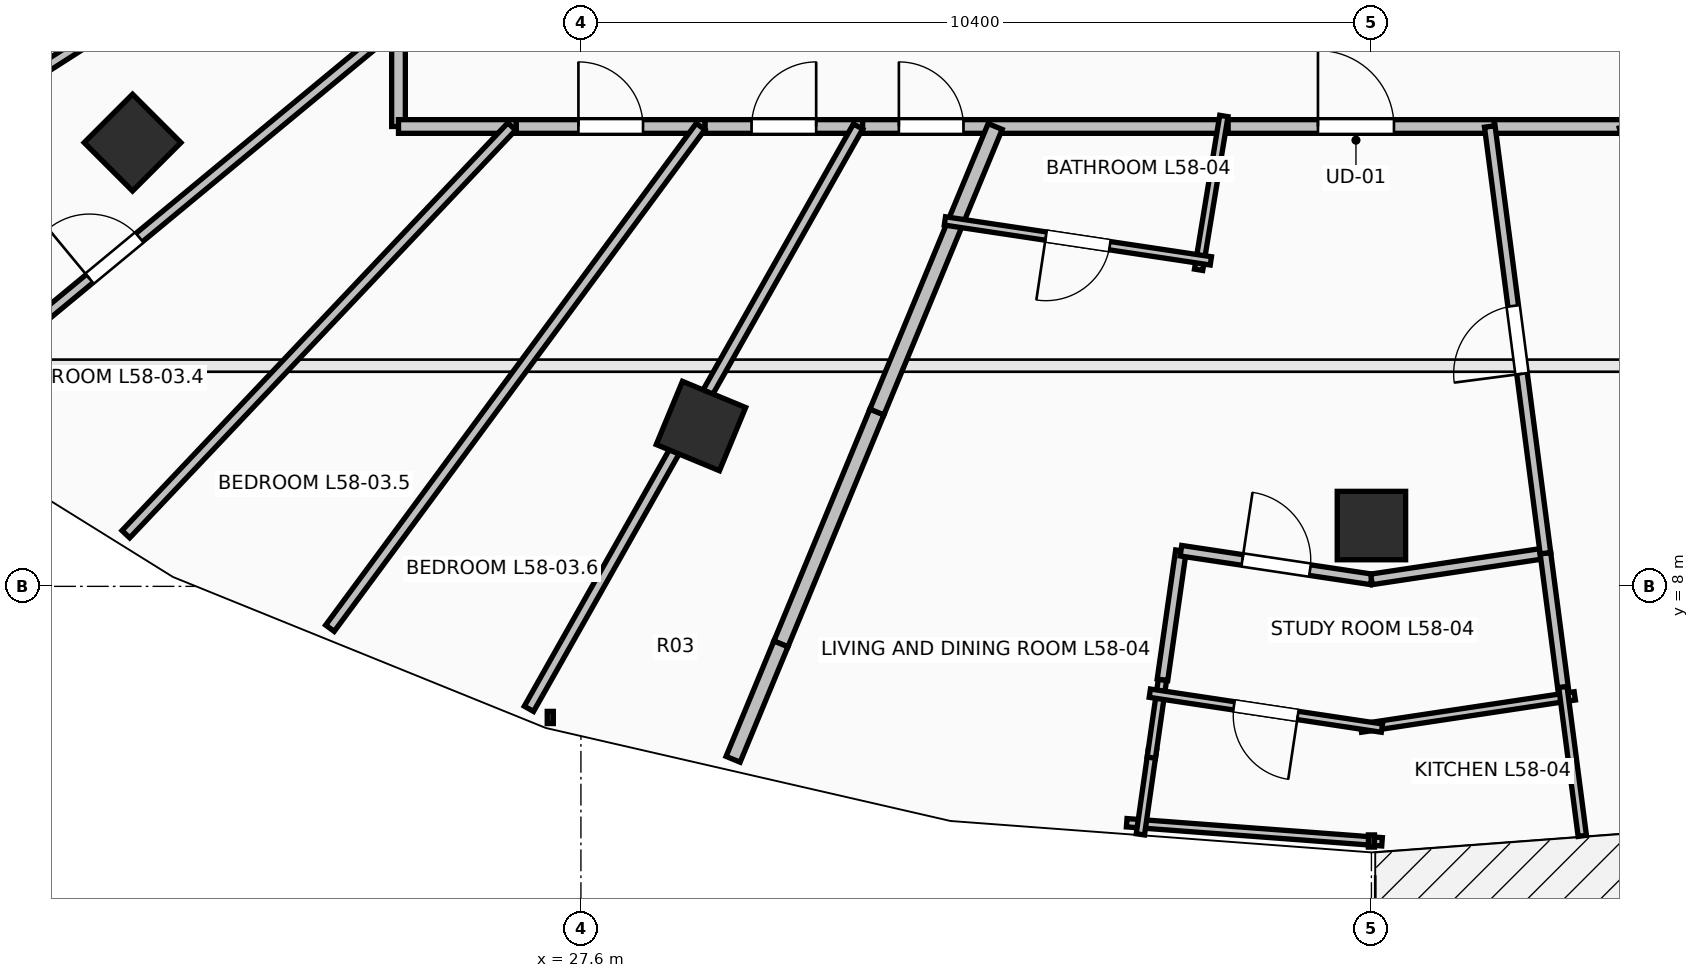
"""IFC4 building model, lengths in metres.
Left out: names, types, materials, properties, quantities, classifications, styles, units other than length and angle.
Written with IfcOpenShell. Run it as: python <this file> out.ifc"""

import sys

from ifc_helpers import new_model, si_unit, direction, frame, frame_2d, origin, origin_2d, place, context, subcontext, project, spatial, rectangle, extrude, element, fill, save


model = new_model("IFC4")
c1 = context("Model", 3, precision=1e-05, world=origin(), true_north=direction((0.0, 1.0)))
c2 = subcontext(c1, "Body", "Model", "MODEL_VIEW")
j1 = project(units=[si_unit("LENGTHUNIT", "METRE"), si_unit("PLANEANGLEUNIT", "RADIAN")], contexts=[c1])
p1 = place(None, origin())
s1 = spatial("IfcSite", under=j1, at=p1, CompositionType="ELEMENT")
p2 = place(p1, origin())
s2 = spatial("IfcBuilding", under=s1, at=p2, CompositionType="ELEMENT")
p3 = place(p2, frame((0.0, 0.0, 214.3)))
s3 = spatial("IfcBuildingStorey", under=s2, at=p3, CompositionType="ELEMENT", Elevation=214.3)
for number, where, z_axis, x_axis in (
    (1, (21.701, 13.838, 0.0), (0.0, 0.0, 1.0), (-0.707, -0.707, 0.0)),
    (2, (29.179, 10.109, 0.0), (0.0, 0.0, 1.0), (-0.383, -0.924, 0.0)),
    (3, (38.0, 8.8, 0.0), (0.0, 0.0, 1.0), (0.0, -1.0, 0.0)),
):
    element("IfcColumn", number, at=place(p3, frame(where, z_axis=z_axis, x_axis=x_axis)), inside=s3, PredefinedType="COLUMN", context=c2, shape_type="SweptSolid", body=[
        extrude(rectangle(XDim=0.9, YDim=0.9, at=origin_2d()), origin(), (0.0, 0.0, 1.0), 3.55),
    ])
p4 = place(p3, frame((25.2, 15.333, 0.0), z_axis=(0.0, 0.0, 1.0), x_axis=(0.0, -1.0, 0.0)))
e4 = element("IfcWall", 4, at=p4, inside=s3, PredefinedType="PARTITIONING", context=c2, shape_type="SweptSolid", body=[
    extrude(rectangle(XDim=1.283, YDim=0.18, at=frame_2d((0.642, 0.0))), origin(), (0.0, 0.0, 1.0), 2.482),
])
p5 = place(p3, frame((25.2, 14.05, 0.0), z_axis=(0.0, 0.0, 1.0), x_axis=(1.0, 0.0, 0.0)))
e5 = element("IfcWall", 5, at=p5, inside=s3, PredefinedType="PARTITIONING", context=c2, shape_type="SweptSolid", body=[
    extrude(rectangle(XDim=1.55, YDim=0.18, at=frame_2d((0.775, 0.0))), origin(), (0.0, 0.0, 1.0), 2.936),
])
p6 = place(p3, frame((26.75, 14.05, 0.0), z_axis=(0.0, 0.0, 1.0), x_axis=(1.0, 0.0, 0.0)))
e6 = element("IfcWall", 6, at=p6, inside=s3, PredefinedType="PARTITIONING", context=c2, shape_type="SweptSolid", body=[
    extrude(rectangle(XDim=2.484, YDim=0.18, at=frame_2d((1.242, 0.0))), origin(), (0.0, 0.0, 1.0), 2.482),
])
p7 = place(p6, frame((0.817, 0.0, 0.0)))
e7 = element("IfcOpeningElement", 7, at=p7, cuts=e6, PredefinedType="OPENING", context=c2, shape_type="SweptSolid", body=[
    extrude(rectangle(XDim=0.85, YDim=2.1, at=frame_2d((0.425, 1.05))), frame((0.0, 0.105, 0.0), z_axis=(0.0, -1.0, 0.0), x_axis=(1.0, 0.0, 0.0)), (0.0, 0.0, 1.0), 0.21),
])
p8 = place(p3, frame((29.234, 14.05, 0.0), z_axis=(0.0, 0.0, 1.0), x_axis=(1.0, 0.0, 0.0)))
e8 = element("IfcWall", 8, at=p8, inside=s3, PredefinedType="PARTITIONING", context=c2, shape_type="SweptSolid", body=[
    extrude(rectangle(XDim=2.072, YDim=0.18, at=frame_2d((1.036, 0.0))), origin(), (0.0, 0.0, 1.0), 3.29),
])
p9 = place(p8, frame((0.611, 0.0, 0.0)))
e9 = element("IfcOpeningElement", 9, at=p9, cuts=e8, PredefinedType="OPENING", context=c2, shape_type="SweptSolid", body=[
    extrude(rectangle(XDim=0.85, YDim=2.1, at=frame_2d((0.425, 1.05))), frame((0.0, 0.105, 0.0), z_axis=(0.0, -1.0, 0.0), x_axis=(1.0, 0.0, 0.0)), (0.0, 0.0, 1.0), 0.21),
])
p10 = place(p3, frame((31.306, 14.05, 0.0), z_axis=(0.0, 0.0, 1.0), x_axis=(1.0, 0.0, 0.0)))
e10 = element("IfcWall", 10, at=p10, inside=s3, PredefinedType="PARTITIONING", context=c2, shape_type="SweptSolid", body=[
    extrude(rectangle(XDim=1.804, YDim=0.18, at=frame_2d((0.902, 0.0))), origin(), (0.0, 0.0, 1.0), 3.29),
])
p11 = place(p10, frame((0.477, 0.0, 0.0)))
e11 = element("IfcOpeningElement", 11, at=p11, cuts=e10, PredefinedType="OPENING", context=c2, shape_type="SweptSolid", body=[
    extrude(rectangle(XDim=0.85, YDim=2.1, at=frame_2d((0.425, 1.05))), frame((0.0, 0.105, 0.0), z_axis=(0.0, -1.0, 0.0), x_axis=(1.0, 0.0, 0.0)), (0.0, 0.0, 1.0), 0.21),
])
p12 = place(p3, frame((35.975, 14.05, 0.0), z_axis=(0.0, 0.0, 1.0), x_axis=(1.0, 0.0, 0.0)))
e12 = element("IfcWall", 12, at=p12, inside=s3, PredefinedType="PARTITIONING", context=c2, shape_type="SweptSolid", body=[
    extrude(rectangle(XDim=3.643, YDim=0.18, at=frame_2d((1.821, 0.0))), origin(), (0.0, 0.0, 1.0), 2.979),
])
p13 = place(p12, frame((1.322, 0.0, 0.0)))
e13 = element("IfcOpeningElement", 13, at=p13, cuts=e12, PredefinedType="OPENING", context=c2, shape_type="SweptSolid", body=[
    extrude(rectangle(XDim=1.0, YDim=2.15, at=frame_2d((0.5, 1.075))), frame((0.0, 0.105, 0.0), z_axis=(0.0, -1.0, 0.0), x_axis=(1.0, 0.0, 0.0)), (0.0, 0.0, 1.0), 0.21),
])
p14 = place(p3, frame((32.97, 14.05, 0.0), z_axis=(0.0, 0.0, 1.0), x_axis=(1.0, 0.0, 0.0)))
e14 = element("IfcWall", 14, at=p14, inside=s3, PredefinedType="PARTITIONING", context=c2, shape_type="SweptSolid", body=[
    extrude(rectangle(XDim=3.145, YDim=0.18, at=frame_2d((1.573, 0.0))), origin(), (0.0, 0.0, 1.0), 2.979),
])
p15 = place(p3, frame((39.618, 14.05, 0.0), z_axis=(0.0, 0.0, 1.0), x_axis=(1.0, 0.0, 0.0)))
e15 = element("IfcWall", 15, at=p15, inside=s3, PredefinedType="PARTITIONING", context=c2, shape_type="SweptSolid", body=[
    extrude(rectangle(XDim=1.772, YDim=0.18, at=frame_2d((0.886, 0.0))), origin(), (0.0, 0.0, 1.0), 2.979),
])
p16 = place(p3, frame((14.217, 14.579, 0.0), z_axis=(0.0, 0.0, 1.0), x_axis=(0.901423599975, 0.432938209689, 0.0)))
e16 = element("IfcWall", 16, at=p16, inside=s3, PredefinedType="PARTITIONING", context=c2, shape_type="SweptSolid", body=[
    extrude(rectangle(XDim=12.184, YDim=0.14, at=frame_2d((6.092, 0.0))), origin(), (0.0, 0.0, 1.0), 2.482),
])
p17 = place(p3, frame((16.555, 12.272, 0.0), z_axis=(0.0, 0.0, 1.0), x_axis=(0.842221721565, 0.539131312135, 0.0)))
e17 = element("IfcWall", 17, at=p17, inside=s3, PredefinedType="PARTITIONING", context=c2, shape_type="SweptSolid", body=[
    extrude(rectangle(XDim=10.265, YDim=0.14, at=frame_2d((5.132, 0.0))), origin(), (0.0, 0.0, 1.0), 2.482),
])
p18 = place(p3, frame((19.02, 10.298, 0.0), z_axis=(0.0, 0.0, 1.0), x_axis=(0.770494327523, 0.637446853671, 0.0)))
e18 = element("IfcWall", 18, at=p18, inside=s3, PredefinedType="PARTITIONING", context=c2, shape_type="SweptSolid", body=[
    extrude(rectangle(XDim=8.021, YDim=0.14, at=frame_2d((4.01, 0.0))), origin(), (0.0, 0.0, 1.0), 2.482),
])
p19 = place(p18, frame((2.746, 0.0, 0.0)))
e19 = element("IfcOpeningElement", 19, at=p19, cuts=e18, PredefinedType="OPENING", context=c2, shape_type="SweptSolid", body=[
    extrude(rectangle(XDim=0.85, YDim=2.1, at=frame_2d((0.425, 1.05))), frame((0.0, 0.085, 0.0), z_axis=(0.0, -1.0, 0.0), x_axis=(1.0, 0.0, 0.0)), (0.0, 0.0, 1.0), 0.17),
])
p20 = place(p3, frame((21.613, 8.686, 0.0), z_axis=(0.0, 0.0, 1.0), x_axis=(0.68740257318, 0.726276601844, 0.0)))
e20 = element("IfcWall", 20, at=p20, inside=s3, PredefinedType="PARTITIONING", context=c2, shape_type="SweptSolid", body=[
    extrude(rectangle(XDim=7.386, YDim=0.14, at=frame_2d((3.693, 0.0))), origin(), (0.0, 0.0, 1.0), 2.824),
])
p21 = place(p3, frame((24.298, 7.449, 0.0), z_axis=(0.0, 0.0, 1.0), x_axis=(0.594148459094, 0.804355399408, 0.0)))
e21 = element("IfcWall", 21, at=p21, inside=s3, PredefinedType="PARTITIONING", context=c2, shape_type="SweptSolid", body=[
    extrude(rectangle(XDim=8.207, YDim=0.14, at=frame_2d((4.103, 0.0))), origin(), (0.0, 0.0, 1.0), 2.482),
])
p22 = place(p3, frame((26.916, 6.389, 0.0), z_axis=(0.0, 0.0, 1.0), x_axis=(0.492046286697, 0.870569039047, 0.0)))
e22 = element("IfcWall", 22, at=p22, inside=s3, PredefinedType="PARTITIONING", context=c2, shape_type="SweptSolid", body=[
    extrude(rectangle(XDim=8.8, YDim=0.14, at=frame_2d((4.4, 0.0))), origin(), (0.0, 0.0, 1.0), 2.482),
])
p23 = place(p3, frame((30.231, 7.243, 0.0), z_axis=(0.0, 0.0, 1.0), x_axis=(0.382467158794, 0.923969086303, 0.0)))
e23 = element("IfcWall", 23, at=p23, inside=s3, PredefinedType="PARTITIONING", context=c2, shape_type="SweptSolid", body=[
    extrude(rectangle(XDim=3.302, YDim=0.2, at=frame_2d((1.651, 0.0))), origin(), (0.0, 0.0, 1.0), 2.824),
])
p24 = place(p3, frame((31.494, 10.294, 0.0), z_axis=(0.0, 0.0, 1.0), x_axis=(0.382751310383, 0.923851413594, 0.0)))
e24 = element("IfcWall", 24, at=p24, inside=s3, PredefinedType="PARTITIONING", context=c2, shape_type="SweptSolid", body=[
    extrude(rectangle(XDim=4.066, YDim=0.2, at=frame_2d((2.033, 0.0))), origin(), (0.0, 0.0, 1.0), 2.936),
])
p25 = place(p3, frame((29.602, 5.725, 0.0), z_axis=(0.0, 0.0, 1.0), x_axis=(0.382789247432, 0.923835695376, 0.0)))
e25 = element("IfcWall", 25, at=p25, inside=s3, PredefinedType="PARTITIONING", context=c2, shape_type="SweptSolid", body=[
    extrude(rectangle(XDim=1.643, YDim=0.2, at=frame_2d((0.822, 0.0))), origin(), (0.0, 0.0, 1.0), 3.29),
])
p26 = place(p3, frame((36.059, 14.188, 0.0), z_axis=(0.0, 0.0, 1.0), x_axis=(-0.16206206721, -0.986780566474, 0.0)))
e26 = element("IfcWall", 26, at=p26, inside=s3, PredefinedType="PARTITIONING", context=c2, shape_type="SweptSolid", body=[
    extrude(rectangle(XDim=2.05, YDim=0.11, at=frame_2d((1.025, 0.0))), origin(), (0.0, 0.0, 1.0), 2.936),
])
p27 = place(p3, frame((35.887, 12.282, 0.0), z_axis=(0.0, 0.0, 1.0), x_axis=(-0.988902415317, 0.148566527121, 0.0)))
e27 = element("IfcWall", 27, at=p27, inside=s3, PredefinedType="PARTITIONING", context=c2, shape_type="SweptSolid", body=[
    extrude(rectangle(XDim=3.538, YDim=0.11, at=frame_2d((1.769, 0.0))), origin(), (0.0, 0.0, 1.0), 2.936),
])
p28 = place(p27, frame((1.344, 0.0, 0.0)))
e28 = element("IfcOpeningElement", 28, at=p28, cuts=e27, PredefinedType="OPENING", context=c2, shape_type="SweptSolid", body=[
    extrude(rectangle(XDim=0.85, YDim=2.1, at=frame_2d((0.425, 1.05))), frame((0.0, 0.07, 0.0), z_axis=(0.0, -1.0, 0.0), x_axis=(1.0, 0.0, 0.0)), (0.0, 0.0, 1.0), 0.14),
])
p29 = place(p3, frame((34.781, 4.89, 0.0), z_axis=(0.0, 0.0, 1.0), x_axis=(0.997225868556, -0.07443498561, 0.0)))
e29 = element("IfcWall", 29, at=p29, inside=s3, PredefinedType="PARTITIONING", context=c2, shape_type="SweptSolid", body=[
    extrude(rectangle(XDim=3.368, YDim=0.11, at=frame_2d((1.684, 0.0))), origin(), (0.0, 0.0, 1.0), 3.29),
])
p30 = place(p3, frame((34.96, 4.737, 0.0), z_axis=(0.0, 0.0, 1.0), x_axis=(0.141118797845, 0.989992669112, 0.0)))
e30 = element("IfcWall", 30, at=p30, inside=s3, PredefinedType="PARTITIONING", context=c2, shape_type="SweptSolid", body=[
    extrude(rectangle(XDim=1.13, YDim=0.11, at=frame_2d((0.565, 0.0))), origin(), (0.0, 0.0, 1.0), 3.29),
])
p31 = place(p3, frame((35.104, 5.747, 0.0), z_axis=(0.0, 0.0, 1.0), x_axis=(0.141751551652, 0.989902266693, 0.0)))
e31 = element("IfcWall", 31, at=p31, inside=s3, PredefinedType="PARTITIONING", context=c2, shape_type="SweptSolid", body=[
    extrude(rectangle(XDim=1.035, YDim=0.11, at=frame_2d((0.518, 0.0))), origin(), (0.0, 0.0, 1.0), 3.29),
])
p32 = place(p3, frame((35.251, 6.771, 0.0), z_axis=(0.0, 0.0, 1.0), x_axis=(0.141660537741, 0.98991529539, 0.0)))
e32 = element("IfcWall", 32, at=p32, inside=s3, PredefinedType="PARTITIONING", context=c2, shape_type="SweptSolid", body=[
    extrude(rectangle(XDim=1.715, YDim=0.14, at=frame_2d((0.857, 0.0))), origin(), (0.0, 0.0, 1.0), 3.29),
])
p33 = place(p3, frame((35.494, 8.469, 0.0), z_axis=(0.0, 0.0, 1.0), x_axis=(0.988876209798, -0.148740854158, 0.0)))
e33 = element("IfcWall", 33, at=p33, inside=s3, PredefinedType="PARTITIONING", context=c2, shape_type="SweptSolid", body=[
    extrude(rectangle(XDim=2.534, YDim=0.14, at=frame_2d((1.267, 0.0))), origin(), (0.0, 0.0, 1.0), 3.29),
])
p34 = place(p33, frame((0.817, 0.0, 0.0)))
e34 = element("IfcOpeningElement", 34, at=p34, cuts=e33, PredefinedType="OPENING", context=c2, shape_type="SweptSolid", body=[
    extrude(rectangle(XDim=0.9, YDim=2.1, at=frame_2d((0.45, 1.05))), frame((0.0, 0.085, 0.0), z_axis=(0.0, -1.0, 0.0), x_axis=(1.0, 0.0, 0.0)), (0.0, 0.0, 1.0), 0.17),
])
p35 = place(p3, frame((38.0, 8.092, 0.0), z_axis=(0.0, 0.0, 1.0), x_axis=(0.988896087956, 0.148608637791, 0.0)))
e35 = element("IfcWall", 35, at=p35, inside=s3, PredefinedType="PARTITIONING", context=c2, shape_type="SweptSolid", body=[
    extrude(rectangle(XDim=2.315, YDim=0.14, at=frame_2d((1.157, 0.0))), origin(), (0.0, 0.0, 1.0), 3.29),
])
p36 = place(p3, frame((40.289, 8.436, 0.0), z_axis=(0.0, 0.0, 1.0), x_axis=(0.12959001093, -0.991567662375, 0.0)))
e36 = element("IfcWall", 36, at=p36, inside=s3, PredefinedType="PARTITIONING", context=c2, shape_type="SweptSolid", body=[
    extrude(rectangle(XDim=1.914, YDim=0.14, at=frame_2d((0.957, 0.0))), origin(), (0.0, 0.0, 1.0), 3.29),
])
p37 = place(p3, frame((40.289, 8.436, 0.0), z_axis=(0.0, 0.0, 1.0), x_axis=(-0.12936683678, 0.991596803919, 0.0)))
e37 = element("IfcWall", 37, at=p37, inside=s3, PredefinedType="PARTITIONING", context=c2, shape_type="SweptSolid", body=[
    extrude(rectangle(XDim=5.662, YDim=0.14, at=frame_2d((2.831, 0.0))), origin(), (0.0, 0.0, 1.0), 2.482),
])
p38 = place(p37, frame((2.381, 0.0, 0.0)))
e38 = element("IfcOpeningElement", 38, at=p38, cuts=e37, PredefinedType="OPENING", context=c2, shape_type="SweptSolid", body=[
    extrude(rectangle(XDim=0.9, YDim=2.1, at=frame_2d((0.45, 1.05))), frame((0.0, 0.085, 0.0), z_axis=(0.0, -1.0, 0.0), x_axis=(1.0, 0.0, 0.0)), (0.0, 0.0, 1.0), 0.17),
])
p39 = place(p3, frame((40.675, 6.559, 0.0), z_axis=(0.0, 0.0, 1.0), x_axis=(-0.988857545323, -0.148864888602, 0.0)))
e39 = element("IfcWall", 39, at=p39, inside=s3, PredefinedType="PARTITIONING", context=c2, shape_type="SweptSolid", body=[
    extrude(rectangle(XDim=2.845, YDim=0.11, at=frame_2d((1.423, 0.0))), origin(), (0.0, 0.0, 1.0), 3.29),
])
p40 = place(p3, frame((38.138, 6.135, 0.0), z_axis=(0.0, 0.0, 1.0), x_axis=(-0.988868983452, 0.148788889259, 0.0)))
e40 = element("IfcWall", 40, at=p40, inside=s3, PredefinedType="PARTITIONING", context=c2, shape_type="SweptSolid", body=[
    extrude(rectangle(XDim=3.088, YDim=0.11, at=frame_2d((1.544, 0.0))), origin(), (0.0, 0.0, 1.0), 3.29),
])
p41 = place(p40, frame((1.119, 0.0, 0.0)))
e41 = element("IfcOpeningElement", 41, at=p41, cuts=e40, PredefinedType="OPENING", context=c2, shape_type="SweptSolid", body=[
    extrude(rectangle(XDim=0.85, YDim=2.1, at=frame_2d((0.425, 1.05))), frame((0.0, 0.07, 0.0), z_axis=(0.0, -1.0, 0.0), x_axis=(1.0, 0.0, 0.0)), (0.0, 0.0, 1.0), 0.14),
])
p42 = place(p3, frame((40.774, 4.717, 0.0), z_axis=(0.0, 0.0, 1.0), x_axis=(-0.129233545587, 0.991614184396, 0.0)))
e42 = element("IfcWall", 42, at=p42, inside=s3, PredefinedType="PARTITIONING", context=c2, shape_type="SweptSolid", body=[
    extrude(rectangle(XDim=1.976, YDim=0.11, at=frame_2d((0.988, 0.0))), origin(), (0.0, 0.0, 1.0), 3.29),
])
p43 = place(p3, frame((43.812, 5.131, 0.0), z_axis=(0.0, 0.0, 1.0), x_axis=(-0.268310216589, 0.963332563383, 0.0)))
e43 = element("IfcWall", 43, at=p43, inside=s3, PredefinedType="PARTITIONING", context=c2, shape_type="SweptSolid", body=[
    extrude(rectangle(XDim=9.259, YDim=0.14, at=frame_2d((4.629, 0.0))), origin(), (0.0, 0.0, 1.0), 2.482),
])
p44 = place(p43, frame((4.204, 0.0, 0.0)))
e44 = element("IfcOpeningElement", 44, at=p44, cuts=e43, PredefinedType="OPENING", context=c2, shape_type="SweptSolid", body=[
    extrude(rectangle(XDim=0.85, YDim=2.1, at=frame_2d((0.425, 1.05))), frame((0.0, 0.085, 0.0), z_axis=(0.0, -1.0, 0.0), x_axis=(1.0, 0.0, 0.0)), (0.0, 0.0, 1.0), 0.17),
])
p45 = place(p13, origin())
e45 = element("IfcDoor", 45, at=p45, inside=s3, OperationType="SINGLE_SWING_LEFT", PredefinedType="DOOR", context=c2, shape_type="SweptSolid", body=[
    extrude(rectangle(XDim=1.0, YDim=2.15, at=frame_2d((0.5, 1.075))), frame((0.0, 0.025, 0.0), z_axis=(0.0, -1.0, 0.0), x_axis=(1.0, 0.0, 0.0)), (0.0, 0.0, 1.0), 0.05),
])
fill(e13, e45)
p46 = place(p28, origin())
e46 = element("IfcDoor", 46, at=p46, inside=s3, OperationType="SINGLE_SWING_RIGHT", PredefinedType="DOOR", context=c2, shape_type="SweptSolid", body=[
    extrude(rectangle(XDim=0.85, YDim=2.1, at=frame_2d((0.425, 1.05))), frame((0.0, 0.025, 0.0), z_axis=(0.0, -1.0, 0.0), x_axis=(1.0, 0.0, 0.0)), (0.0, 0.0, 1.0), 0.05),
])
fill(e28, e46)
p47 = place(p34, origin())
e47 = element("IfcDoor", 47, at=p47, inside=s3, OperationType="SINGLE_SWING_LEFT", PredefinedType="DOOR", context=c2, shape_type="SweptSolid", body=[
    extrude(rectangle(XDim=0.9, YDim=2.1, at=frame_2d((0.45, 1.05))), frame((0.0, 0.025, 0.0), z_axis=(0.0, -1.0, 0.0), x_axis=(1.0, 0.0, 0.0)), (0.0, 0.0, 1.0), 0.05),
])
fill(e34, e47)
p48 = place(p38, origin())
e48 = element("IfcDoor", 48, at=p48, inside=s3, OperationType="SINGLE_SWING_LEFT", PredefinedType="DOOR", context=c2, shape_type="SweptSolid", body=[
    extrude(rectangle(XDim=0.9, YDim=2.1, at=frame_2d((0.45, 1.05))), frame((0.0, 0.025, 0.0), z_axis=(0.0, -1.0, 0.0), x_axis=(1.0, 0.0, 0.0)), (0.0, 0.0, 1.0), 0.05),
])
fill(e38, e48)
p49 = place(p7, origin())
e49 = element("IfcDoor", 49, at=p49, inside=s3, OperationType="SINGLE_SWING_LEFT", PredefinedType="DOOR", context=c2, shape_type="SweptSolid", body=[
    extrude(rectangle(XDim=0.85, YDim=2.1, at=frame_2d((0.425, 1.05))), frame((0.0, 0.025, 0.0), z_axis=(0.0, -1.0, 0.0), x_axis=(1.0, 0.0, 0.0)), (0.0, 0.0, 1.0), 0.05),
])
fill(e7, e49)
p50 = place(p9, origin())
e50 = element("IfcDoor", 50, at=p50, inside=s3, OperationType="SINGLE_SWING_RIGHT", PredefinedType="DOOR", context=c2, shape_type="SweptSolid", body=[
    extrude(rectangle(XDim=0.85, YDim=2.1, at=frame_2d((0.425, 1.05))), frame((0.0, 0.025, 0.0), z_axis=(0.0, -1.0, 0.0), x_axis=(1.0, 0.0, 0.0)), (0.0, 0.0, 1.0), 0.05),
])
fill(e9, e50)
p51 = place(p11, origin())
e51 = element("IfcDoor", 51, at=p51, inside=s3, OperationType="SINGLE_SWING_LEFT", PredefinedType="DOOR", context=c2, shape_type="SweptSolid", body=[
    extrude(rectangle(XDim=0.85, YDim=2.1, at=frame_2d((0.425, 1.05))), frame((0.0, 0.025, 0.0), z_axis=(0.0, -1.0, 0.0), x_axis=(1.0, 0.0, 0.0)), (0.0, 0.0, 1.0), 0.05),
])
fill(e11, e51)
p52 = place(p19, origin())
e52 = element("IfcDoor", 52, at=p52, inside=s3, OperationType="SINGLE_SWING_LEFT", PredefinedType="DOOR", context=c2, shape_type="SweptSolid", body=[
    extrude(rectangle(XDim=0.85, YDim=2.1, at=frame_2d((0.425, 1.05))), frame((0.0, 0.025, 0.0), z_axis=(0.0, -1.0, 0.0), x_axis=(1.0, 0.0, 0.0)), (0.0, 0.0, 1.0), 0.05),
])
fill(e19, e52)
p53 = place(p41, origin())
e53 = element("IfcDoor", 53, at=p53, inside=s3, OperationType="SINGLE_SWING_LEFT", PredefinedType="DOOR", context=c2, shape_type="SweptSolid", body=[
    extrude(rectangle(XDim=0.85, YDim=2.1, at=frame_2d((0.425, 1.05))), frame((0.0, 0.025, 0.0), z_axis=(0.0, -1.0, 0.0), x_axis=(1.0, 0.0, 0.0)), (0.0, 0.0, 1.0), 0.05),
])
fill(e41, e53)
save(model, sys.argv[1])
